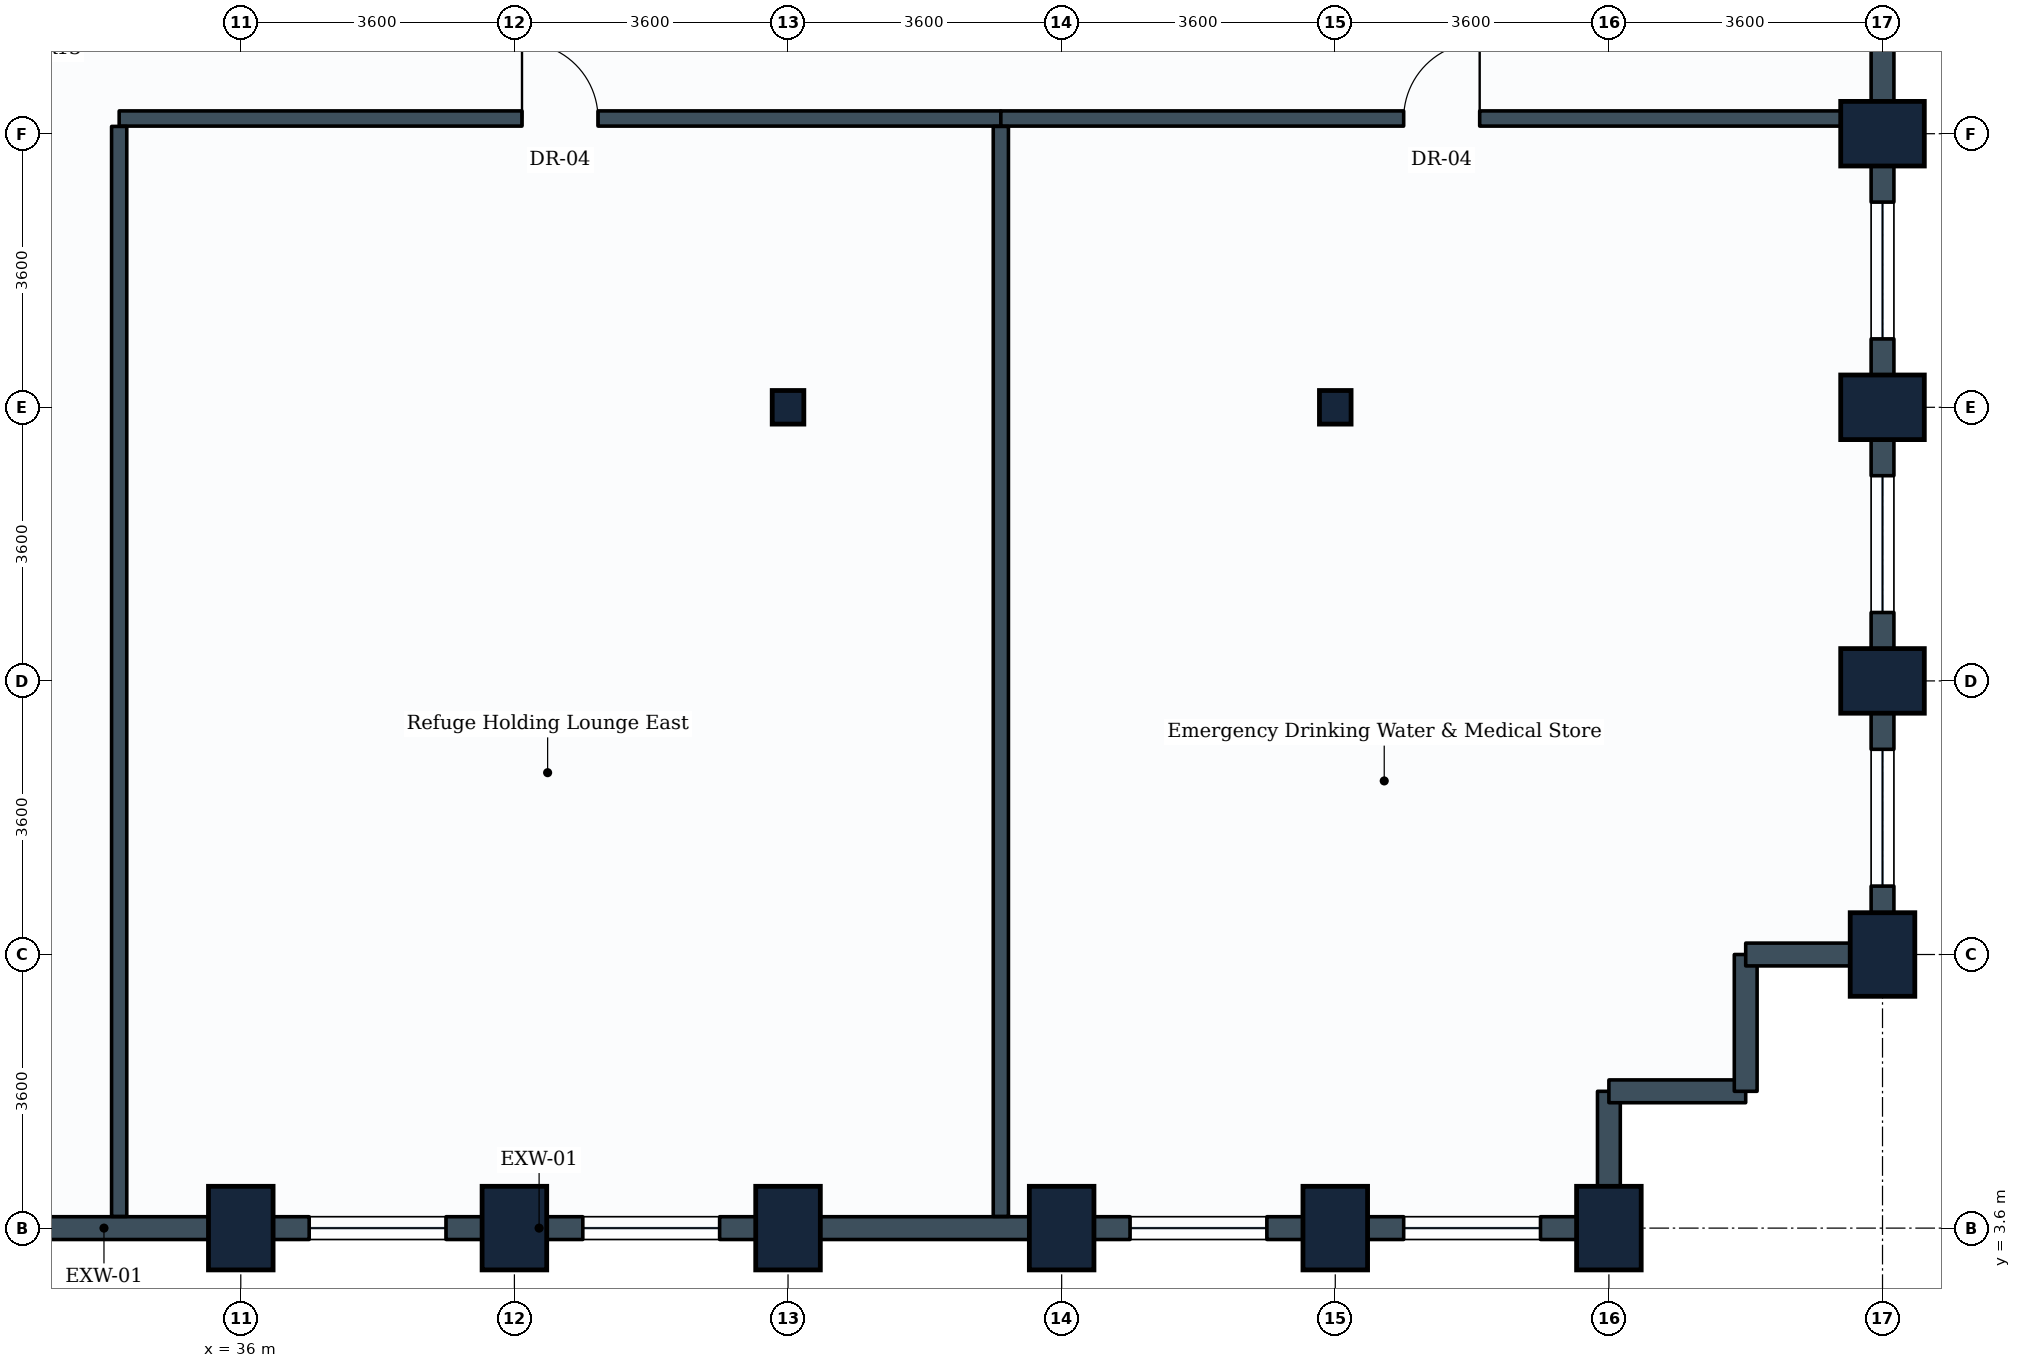
"""IFC4 building model, lengths in metres.
Left out: names, types, materials, properties, quantities, classifications, styles, units other than length and angle.
Written with IfcOpenShell. Run it as: python <this file> out.ifc"""

import sys

from ifc_helpers import new_model, si_unit, direction, frame, frame_2d, origin, origin_2d, place, context, subcontext, project, spatial, rectangle, i_section, extrude, element, fill, save


model = new_model("IFC4")
c1 = context("Model", 3, precision=1e-05, world=origin(), true_north=direction((0.0, 1.0)))
c2 = subcontext(c1, "Body", "Model", "MODEL_VIEW")
j1 = project(units=[si_unit("LENGTHUNIT", "METRE"), si_unit("PLANEANGLEUNIT", "RADIAN")], contexts=[c1])
p1 = place(None, origin())
s1 = spatial("IfcSite", under=j1, at=p1, CompositionType="ELEMENT")
p2 = place(p1, origin())
s2 = spatial("IfcBuilding", under=s1, at=p2, CompositionType="ELEMENT")
p3 = place(p2, frame((0.0, 0.0, 120.0)))
s3 = spatial("IfcBuildingStorey", under=s2, at=p3, CompositionType="ELEMENT", Elevation=120.0)
for number, where, z_axis, x_axis in (
    (1, (36.0, 3.6, 0.0), (0.0, 0.0, 1.0), (1.0, 0.0, 0.0)),
    (2, (39.6, 3.6, 0.0), (0.0, 0.0, 1.0), (1.0, 0.0, 0.0)),
    (3, (43.2, 3.6, 0.0), (0.0, 0.0, 1.0), (1.0, 0.0, 0.0)),
):
    element("IfcColumn", number, at=place(p3, frame(where, z_axis=z_axis, x_axis=x_axis)), inside=s3, PredefinedType="COLUMN", context=c2, shape_type="SweptSolid", body=[
        extrude(rectangle(XDim=0.85, YDim=1.1, at=origin_2d()), origin(), (0.0, 0.0, 1.0), 3.8),
    ])
p4 = place(p3, frame((43.2, 14.4, 0.0), z_axis=(0.0, 0.0, 1.0), x_axis=(1.0, 0.0, 0.0)))
e4 = element("IfcColumn", 4, at=p4, inside=s3, PredefinedType="COLUMN", context=c2, shape_type="SweptSolid", body=[
    extrude(i_section(OverallWidth=0.416, OverallDepth=0.442, WebThickness=0.025, FlangeThickness=0.041, FilletRadius=0.015, at=origin_2d()), origin(), (0.0, 0.0, 1.0), 3.8),
])
for number, where, z_axis, x_axis in (
    (5, (46.8, 3.6, 0.0), (0.0, 0.0, 1.0), (1.0, 0.0, 0.0)),
    (6, (50.4, 3.6, 0.0), (0.0, 0.0, 1.0), (1.0, 0.0, 0.0)),
):
    element("IfcColumn", number, at=place(p3, frame(where, z_axis=z_axis, x_axis=x_axis)), inside=s3, PredefinedType="COLUMN", context=c2, shape_type="SweptSolid", body=[
        extrude(rectangle(XDim=0.85, YDim=1.1, at=origin_2d()), origin(), (0.0, 0.0, 1.0), 3.8),
    ])
p5 = place(p3, frame((50.4, 14.4, 0.0), z_axis=(0.0, 0.0, 1.0), x_axis=(1.0, 0.0, 0.0)))
e7 = element("IfcColumn", 7, at=p5, inside=s3, PredefinedType="COLUMN", context=c2, shape_type="SweptSolid", body=[
    extrude(i_section(OverallWidth=0.416, OverallDepth=0.442, WebThickness=0.025, FlangeThickness=0.041, FilletRadius=0.015, at=origin_2d()), origin(), (0.0, 0.0, 1.0), 3.8),
])
for number, where, z_axis, x_axis in (
    (8, (54.0, 3.6, 0.0), (0.0, 0.0, 1.0), (1.0, 0.0, 0.0)),
    (9, (57.6, 7.2, 0.0), (0.0, 0.0, 1.0), (1.0, 0.0, 0.0)),
    (10, (57.6, 10.8, 0.0), (0.0, 0.0, 1.0), (0.0, 1.0, 0.0)),
    (11, (57.6, 14.4, 0.0), (0.0, 0.0, 1.0), (0.0, 1.0, 0.0)),
    (12, (57.6, 18.0, 0.0), (0.0, 0.0, 1.0), (0.0, 1.0, 0.0)),
):
    element("IfcColumn", number, at=place(p3, frame(where, z_axis=z_axis, x_axis=x_axis)), inside=s3, PredefinedType="COLUMN", context=c2, shape_type="SweptSolid", body=[
        extrude(rectangle(XDim=0.85, YDim=1.1, at=origin_2d()), origin(), (0.0, 0.0, 1.0), 3.8),
    ])
p6 = place(p3, frame((36.0, 3.6, 0.0), z_axis=(0.0, 0.0, 1.0), x_axis=(-1.0, 0.0, 0.0)))
e13 = element("IfcWall", 13, at=p6, inside=s3, PredefinedType="STANDARD", context=c2, shape_type="SweptSolid", body=[
    extrude(rectangle(XDim=3.6, YDim=0.3, at=frame_2d((1.8, 0.0))), origin(), (0.0, 0.0, 1.0), 2.93),
])
p7 = place(p3, frame((39.6, 3.6, 0.0), z_axis=(0.0, 0.0, 1.0), x_axis=(-1.0, 0.0, 0.0)))
e14 = element("IfcWall", 14, at=p7, inside=s3, PredefinedType="STANDARD", context=c2, shape_type="SweptSolid", body=[
    extrude(rectangle(XDim=3.6, YDim=0.3, at=frame_2d((1.8, 0.0))), origin(), (0.0, 0.0, 1.0), 2.93),
])
p8 = place(p7, frame((0.9, 0.0, 0.85)))
e15 = element("IfcOpeningElement", 15, at=p8, cuts=e14, PredefinedType="OPENING", context=c2, shape_type="SweptSolid", body=[
    extrude(rectangle(XDim=1.8, YDim=1.35, at=frame_2d((0.9, 0.675))), frame((0.0, 0.16, 0.0), z_axis=(0.0, -1.0, 0.0), x_axis=(1.0, 0.0, 0.0)), (0.0, 0.0, 1.0), 0.32),
])
p9 = place(p3, frame((43.2, 3.6, 0.0), z_axis=(0.0, 0.0, 1.0), x_axis=(-1.0, 0.0, 0.0)))
e16 = element("IfcWall", 16, at=p9, inside=s3, PredefinedType="STANDARD", context=c2, shape_type="SweptSolid", body=[
    extrude(rectangle(XDim=3.6, YDim=0.3, at=frame_2d((1.8, 0.0))), origin(), (0.0, 0.0, 1.0), 2.93),
])
p10 = place(p9, frame((0.9, 0.0, 0.85)))
e17 = element("IfcOpeningElement", 17, at=p10, cuts=e16, PredefinedType="OPENING", context=c2, shape_type="SweptSolid", body=[
    extrude(rectangle(XDim=1.8, YDim=1.35, at=frame_2d((0.9, 0.675))), frame((0.0, 0.16, 0.0), z_axis=(0.0, -1.0, 0.0), x_axis=(1.0, 0.0, 0.0)), (0.0, 0.0, 1.0), 0.32),
])
p11 = place(p3, frame((46.8, 3.6, 0.0), z_axis=(0.0, 0.0, 1.0), x_axis=(-1.0, 0.0, 0.0)))
e18 = element("IfcWall", 18, at=p11, inside=s3, PredefinedType="STANDARD", context=c2, shape_type="SweptSolid", body=[
    extrude(rectangle(XDim=3.6, YDim=0.3, at=frame_2d((1.8, 0.0))), origin(), (0.0, 0.0, 1.0), 2.93),
])
p12 = place(p3, frame((50.4, 3.6, 0.0), z_axis=(0.0, 0.0, 1.0), x_axis=(-1.0, 0.0, 0.0)))
e19 = element("IfcWall", 19, at=p12, inside=s3, PredefinedType="STANDARD", context=c2, shape_type="SweptSolid", body=[
    extrude(rectangle(XDim=3.6, YDim=0.3, at=frame_2d((1.8, 0.0))), origin(), (0.0, 0.0, 1.0), 2.93),
])
p13 = place(p12, frame((0.9, 0.0, 0.85)))
e20 = element("IfcOpeningElement", 20, at=p13, cuts=e19, PredefinedType="OPENING", context=c2, shape_type="SweptSolid", body=[
    extrude(rectangle(XDim=1.8, YDim=1.35, at=frame_2d((0.9, 0.675))), frame((0.0, 0.16, 0.0), z_axis=(0.0, -1.0, 0.0), x_axis=(1.0, 0.0, 0.0)), (0.0, 0.0, 1.0), 0.32),
])
p14 = place(p3, frame((54.0, 3.6, 0.0), z_axis=(0.0, 0.0, 1.0), x_axis=(-1.0, 0.0, 0.0)))
e21 = element("IfcWall", 21, at=p14, inside=s3, PredefinedType="STANDARD", context=c2, shape_type="SweptSolid", body=[
    extrude(rectangle(XDim=3.6, YDim=0.3, at=frame_2d((1.8, 0.0))), origin(), (0.0, 0.0, 1.0), 2.93),
])
p15 = place(p14, frame((0.9, 0.0, 0.85)))
e22 = element("IfcOpeningElement", 22, at=p15, cuts=e21, PredefinedType="OPENING", context=c2, shape_type="SweptSolid", body=[
    extrude(rectangle(XDim=1.8, YDim=1.35, at=frame_2d((0.9, 0.675))), frame((0.0, 0.16, 0.0), z_axis=(0.0, -1.0, 0.0), x_axis=(1.0, 0.0, 0.0)), (0.0, 0.0, 1.0), 0.32),
])
p16 = place(p3, frame((54.0, 5.4, 0.0), z_axis=(0.0, 0.0, 1.0), x_axis=(0.0, -1.0, 0.0)))
e23 = element("IfcWall", 23, at=p16, inside=s3, PredefinedType="STANDARD", context=c2, shape_type="SweptSolid", body=[
    extrude(rectangle(XDim=1.8, YDim=0.3, at=frame_2d((0.9, 0.0))), origin(), (0.0, 0.0, 1.0), 2.93),
])
for number, where, z_axis, x_axis in (
    (24, (55.8, 5.4, 0.0), (0.0, 0.0, 1.0), (-1.0, 0.0, 0.0)),
    (25, (55.8, 7.2, 0.0), (0.0, 0.0, 1.0), (0.0, -1.0, 0.0)),
):
    element("IfcWall", number, at=place(p3, frame(where, z_axis=z_axis, x_axis=x_axis)), inside=s3, PredefinedType="STANDARD", context=c2, shape_type="SweptSolid", body=[
        extrude(rectangle(XDim=1.8, YDim=0.3, at=frame_2d((0.9, 0.0))), origin(), (0.0, 0.0, 1.0), 3.535),
    ])
p17 = place(p3, frame((57.6, 7.2, 0.0), z_axis=(0.0, 0.0, 1.0), x_axis=(-1.0, 0.0, 0.0)))
e26 = element("IfcWall", 26, at=p17, inside=s3, PredefinedType="STANDARD", context=c2, shape_type="SweptSolid", body=[
    extrude(rectangle(XDim=1.8, YDim=0.3, at=frame_2d((0.9, 0.0))), origin(), (0.0, 0.0, 1.0), 2.93),
])
p18 = place(p3, frame((57.6, 10.8, 0.0), z_axis=(0.0, 0.0, 1.0), x_axis=(0.0, -1.0, 0.0)))
e27 = element("IfcWall", 27, at=p18, inside=s3, PredefinedType="STANDARD", context=c2, shape_type="SweptSolid", body=[
    extrude(rectangle(XDim=3.6, YDim=0.3, at=frame_2d((1.8, 0.0))), origin(), (0.0, 0.0, 1.0), 2.93),
])
p19 = place(p18, frame((0.9, 0.0, 0.85)))
e28 = element("IfcOpeningElement", 28, at=p19, cuts=e27, PredefinedType="OPENING", context=c2, shape_type="SweptSolid", body=[
    extrude(rectangle(XDim=1.8, YDim=1.35, at=frame_2d((0.9, 0.675))), frame((0.0, 0.16, 0.0), z_axis=(0.0, -1.0, 0.0), x_axis=(1.0, 0.0, 0.0)), (0.0, 0.0, 1.0), 0.32),
])
p20 = place(p3, frame((57.6, 14.4, 0.0), z_axis=(0.0, 0.0, 1.0), x_axis=(0.0, -1.0, 0.0)))
e29 = element("IfcWall", 29, at=p20, inside=s3, PredefinedType="STANDARD", context=c2, shape_type="SweptSolid", body=[
    extrude(rectangle(XDim=3.6, YDim=0.3, at=frame_2d((1.8, 0.0))), origin(), (0.0, 0.0, 1.0), 2.93),
])
p21 = place(p20, frame((0.9, 0.0, 0.85)))
e30 = element("IfcOpeningElement", 30, at=p21, cuts=e29, PredefinedType="OPENING", context=c2, shape_type="SweptSolid", body=[
    extrude(rectangle(XDim=1.8, YDim=1.35, at=frame_2d((0.9, 0.675))), frame((0.0, 0.16, 0.0), z_axis=(0.0, -1.0, 0.0), x_axis=(1.0, 0.0, 0.0)), (0.0, 0.0, 1.0), 0.32),
])
p22 = place(p3, frame((57.6, 18.0, 0.0), z_axis=(0.0, 0.0, 1.0), x_axis=(0.0, -1.0, 0.0)))
e31 = element("IfcWall", 31, at=p22, inside=s3, PredefinedType="STANDARD", context=c2, shape_type="SweptSolid", body=[
    extrude(rectangle(XDim=3.6, YDim=0.3, at=frame_2d((1.8, 0.0))), origin(), (0.0, 0.0, 1.0), 2.93),
])
p23 = place(p22, frame((0.9, 0.0, 0.85)))
e32 = element("IfcOpeningElement", 32, at=p23, cuts=e31, PredefinedType="OPENING", context=c2, shape_type="SweptSolid", body=[
    extrude(rectangle(XDim=1.8, YDim=1.35, at=frame_2d((0.9, 0.675))), frame((0.0, 0.16, 0.0), z_axis=(0.0, -1.0, 0.0), x_axis=(1.0, 0.0, 0.0)), (0.0, 0.0, 1.0), 0.32),
])
p24 = place(p3, frame((57.6, 21.6, 0.0), z_axis=(0.0, 0.0, 1.0), x_axis=(0.0, -1.0, 0.0)))
e33 = element("IfcWall", 33, at=p24, inside=s3, PredefinedType="STANDARD", context=c2, shape_type="SweptSolid", body=[
    extrude(rectangle(XDim=3.6, YDim=0.3, at=frame_2d((1.8, 0.0))), origin(), (0.0, 0.0, 1.0), 2.93),
])
p25 = place(p3, frame((34.4, 18.2, 0.0), z_axis=(0.0, 0.0, 1.0), x_axis=(1.0, 0.0, 0.0)))
e34 = element("IfcWall", 34, at=p25, inside=s3, PredefinedType="PARTITIONING", context=c2, shape_type="SweptSolid", body=[
    extrude(rectangle(XDim=11.6, YDim=0.2, at=frame_2d((5.8, 0.0))), origin(), (0.0, 0.0, 1.0), 3.08),
])
p26 = place(p25, frame((5.3, 0.0, 0.0)))
e35 = element("IfcOpeningElement", 35, at=p26, cuts=e34, PredefinedType="OPENING", context=c2, shape_type="SweptSolid", body=[
    extrude(rectangle(XDim=1.0, YDim=2.1, at=frame_2d((0.5, 1.05))), frame((0.0, 0.11, 0.0), z_axis=(0.0, -1.0, 0.0), x_axis=(1.0, 0.0, 0.0)), (0.0, 0.0, 1.0), 0.22),
])
p27 = place(p3, frame((46.0, 18.2, 0.0), z_axis=(0.0, 0.0, 1.0), x_axis=(1.0, 0.0, 0.0)))
e36 = element("IfcWall", 36, at=p27, inside=s3, PredefinedType="PARTITIONING", context=c2, shape_type="SweptSolid", body=[
    extrude(rectangle(XDim=11.446, YDim=0.2, at=frame_2d((5.723, 0.0))), origin(), (0.0, 0.0, 1.0), 2.93),
])
p28 = place(p27, frame((5.3, 0.0, 0.0)))
e37 = element("IfcOpeningElement", 37, at=p28, cuts=e36, PredefinedType="OPENING", context=c2, shape_type="SweptSolid", body=[
    extrude(rectangle(XDim=1.0, YDim=2.1, at=frame_2d((0.5, 1.05))), frame((0.0, 0.11, 0.0), z_axis=(0.0, -1.0, 0.0), x_axis=(1.0, 0.0, 0.0)), (0.0, 0.0, 1.0), 0.22),
])
for number, where, z_axis, x_axis in (
    (38, (34.4, 3.754, 0.0), (0.0, 0.0, 1.0), (0.0, 1.0, 0.0)),
    (39, (46.0, 3.754, 0.0), (0.0, 0.0, 1.0), (0.0, 1.0, 0.0)),
):
    element("IfcWall", number, at=place(p3, frame(where, z_axis=z_axis, x_axis=x_axis)), inside=s3, PredefinedType="PARTITIONING", context=c2, shape_type="SweptSolid", body=[
        extrude(rectangle(XDim=14.342, YDim=0.2, at=frame_2d((7.171, 0.0))), origin(), (0.0, 0.0, 1.0), 2.93),
    ])
p29 = place(p8, origin())
e40 = element("IfcWindow", 40, at=p29, inside=s3, PartitioningType="SINGLE_PANEL", PredefinedType="WINDOW", context=c2, shape_type="SweptSolid", body=[
    extrude(rectangle(XDim=1.8, YDim=1.35, at=frame_2d((0.9, 0.675))), frame((0.0, 0.03, 0.0), z_axis=(0.0, -1.0, 0.0), x_axis=(1.0, 0.0, 0.0)), (0.0, 0.0, 1.0), 0.06),
])
fill(e15, e40)
p30 = place(p10, origin())
e41 = element("IfcWindow", 41, at=p30, inside=s3, PartitioningType="SINGLE_PANEL", PredefinedType="WINDOW", context=c2, shape_type="SweptSolid", body=[
    extrude(rectangle(XDim=1.8, YDim=1.35, at=frame_2d((0.9, 0.675))), frame((0.0, 0.03, 0.0), z_axis=(0.0, -1.0, 0.0), x_axis=(1.0, 0.0, 0.0)), (0.0, 0.0, 1.0), 0.06),
])
fill(e17, e41)
p31 = place(p13, origin())
e42 = element("IfcWindow", 42, at=p31, inside=s3, PartitioningType="SINGLE_PANEL", PredefinedType="WINDOW", context=c2, shape_type="SweptSolid", body=[
    extrude(rectangle(XDim=1.8, YDim=1.35, at=frame_2d((0.9, 0.675))), frame((0.0, 0.03, 0.0), z_axis=(0.0, -1.0, 0.0), x_axis=(1.0, 0.0, 0.0)), (0.0, 0.0, 1.0), 0.06),
])
fill(e20, e42)
p32 = place(p15, origin())
e43 = element("IfcWindow", 43, at=p32, inside=s3, PartitioningType="SINGLE_PANEL", PredefinedType="WINDOW", context=c2, shape_type="SweptSolid", body=[
    extrude(rectangle(XDim=1.8, YDim=1.35, at=frame_2d((0.9, 0.675))), frame((0.0, 0.03, 0.0), z_axis=(0.0, -1.0, 0.0), x_axis=(1.0, 0.0, 0.0)), (0.0, 0.0, 1.0), 0.06),
])
fill(e22, e43)
p33 = place(p19, origin())
e44 = element("IfcWindow", 44, at=p33, inside=s3, PartitioningType="SINGLE_PANEL", PredefinedType="WINDOW", context=c2, shape_type="SweptSolid", body=[
    extrude(rectangle(XDim=1.8, YDim=1.35, at=frame_2d((0.9, 0.675))), frame((0.0, 0.03, 0.0), z_axis=(0.0, -1.0, 0.0), x_axis=(1.0, 0.0, 0.0)), (0.0, 0.0, 1.0), 0.06),
])
fill(e28, e44)
p34 = place(p21, origin())
e45 = element("IfcWindow", 45, at=p34, inside=s3, PartitioningType="SINGLE_PANEL", PredefinedType="WINDOW", context=c2, shape_type="SweptSolid", body=[
    extrude(rectangle(XDim=1.8, YDim=1.35, at=frame_2d((0.9, 0.675))), frame((0.0, 0.03, 0.0), z_axis=(0.0, -1.0, 0.0), x_axis=(1.0, 0.0, 0.0)), (0.0, 0.0, 1.0), 0.06),
])
fill(e30, e45)
p35 = place(p23, origin())
e46 = element("IfcWindow", 46, at=p35, inside=s3, PartitioningType="SINGLE_PANEL", PredefinedType="WINDOW", context=c2, shape_type="SweptSolid", body=[
    extrude(rectangle(XDim=1.8, YDim=1.35, at=frame_2d((0.9, 0.675))), frame((0.0, 0.03, 0.0), z_axis=(0.0, -1.0, 0.0), x_axis=(1.0, 0.0, 0.0)), (0.0, 0.0, 1.0), 0.06),
])
fill(e32, e46)
p36 = place(p26, origin())
e47 = element("IfcDoor", 47, at=p36, inside=s3, OperationType="SINGLE_SWING_LEFT", PredefinedType="DOOR", context=c2, shape_type="SweptSolid", body=[
    extrude(rectangle(XDim=1.0, YDim=2.1, at=frame_2d((0.5, 1.05))), frame((0.0, 0.025, 0.0), z_axis=(0.0, -1.0, 0.0), x_axis=(1.0, 0.0, 0.0)), (0.0, 0.0, 1.0), 0.05),
])
fill(e35, e47)
p37 = place(p28, origin())
e48 = element("IfcDoor", 48, at=p37, inside=s3, OperationType="SINGLE_SWING_RIGHT", PredefinedType="DOOR", context=c2, shape_type="SweptSolid", body=[
    extrude(rectangle(XDim=1.0, YDim=2.1, at=frame_2d((0.5, 1.05))), frame((0.0, 0.025, 0.0), z_axis=(0.0, -1.0, 0.0), x_axis=(1.0, 0.0, 0.0)), (0.0, 0.0, 1.0), 0.05),
])
fill(e37, e48)
save(model, sys.argv[1])
